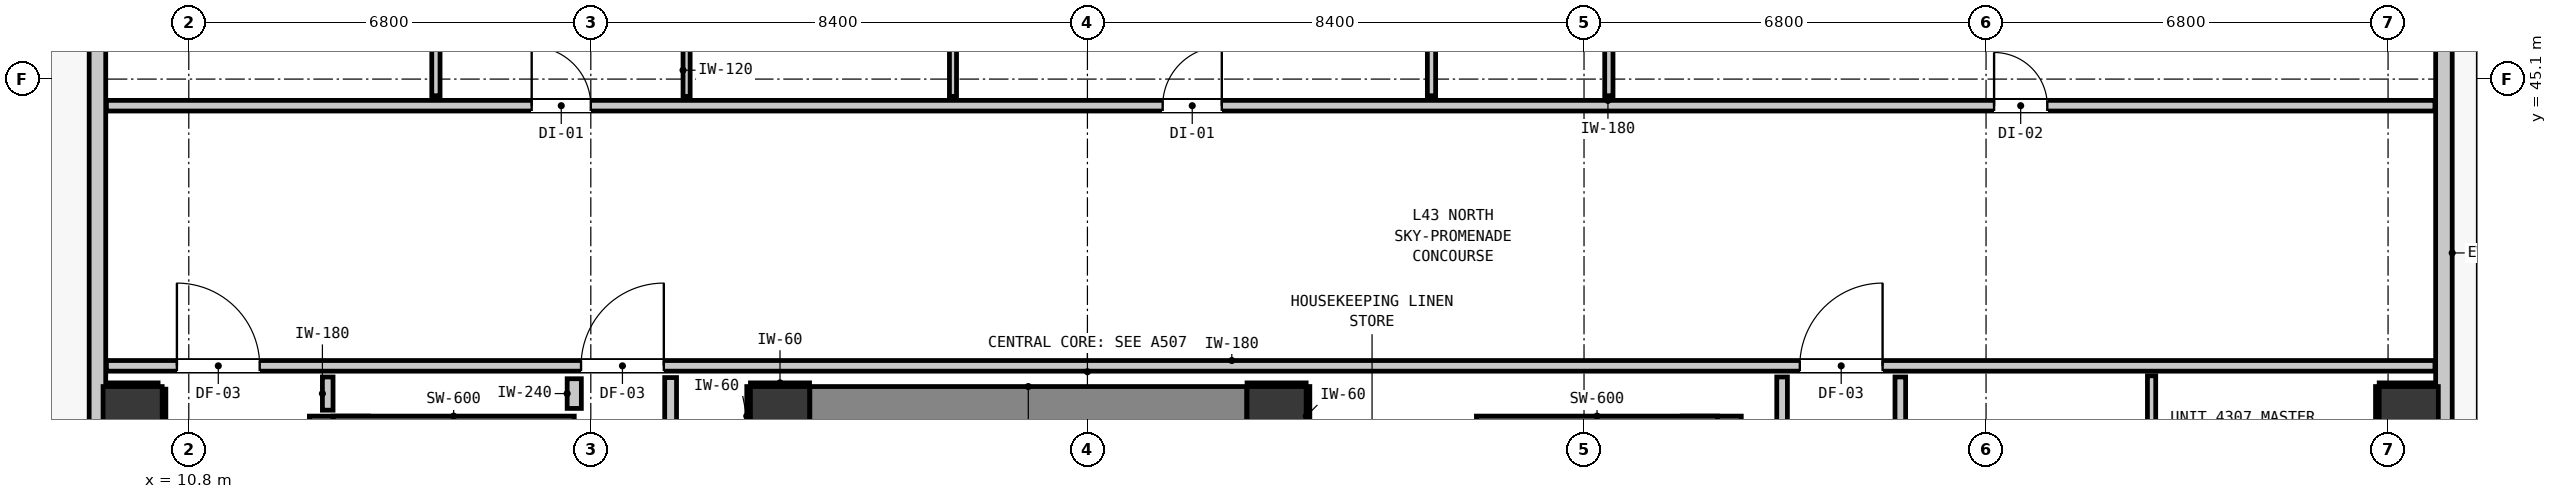
"""IFC4 building model, lengths in metres.
Left out: names, types, materials, properties, quantities, classifications, styles, units other than length and angle.
Written with IfcOpenShell. Run it as: python <this file> out.ifc"""

import sys

from ifc_helpers import new_model, si_unit, direction, frame, frame_2d, origin, origin_2d, place, context, subcontext, project, spatial, rectangle, extrude, element, fill, save


model = new_model("IFC4")
c1 = context("Model", 3, precision=1e-05, world=origin(), true_north=direction((0.0, 1.0)))
c2 = subcontext(c1, "Body", "Model", "MODEL_VIEW")
j1 = project(units=[si_unit("LENGTHUNIT", "METRE"), si_unit("PLANEANGLEUNIT", "RADIAN")], contexts=[c1])
p1 = place(None, origin())
s1 = spatial("IfcSite", under=j1, at=p1, CompositionType="ELEMENT")
p2 = place(p1, origin())
s2 = spatial("IfcBuilding", under=s1, at=p2, CompositionType="ELEMENT")
p3 = place(p2, frame((0.0, 0.0, 149.24)))
s3 = spatial("IfcBuildingStorey", under=s2, at=p3, CompositionType="ELEMENT", Elevation=149.24)
for number, where, z_axis, x_axis in (
    (1, (20.8, 39.4, 0.0), (0.0, 0.0, 1.0), (1.0, 0.0, 0.0)),
    (2, (29.2, 39.4, 0.0), (0.0, 0.0, 1.0), (1.0, 0.0, 0.0)),
):
    element("IfcColumn", number, at=place(p3, frame(where, z_axis=z_axis, x_axis=x_axis)), inside=s3, PredefinedType="COLUMN", context=c2, shape_type="SweptSolid", body=[
        extrude(rectangle(XDim=1.0, YDim=1.0, at=origin_2d()), origin(), (0.0, 0.0, 1.0), 3.32),
    ])
p4 = place(p3, frame((13.34, 31.205, 0.0), z_axis=(0.0, 0.0, 1.0), x_axis=(0.0, 1.0, 0.0)))
e3 = element("IfcWall", 3, at=p4, inside=s3, PredefinedType="SHEAR", context=c2, shape_type="SweptSolid", body=[
    extrude(rectangle(XDim=8.195, YDim=1.0, at=frame_2d((4.097, 0.0))), origin(), (0.0, 0.0, 1.0), 3.32),
])
p5 = place(p3, frame((13.24, 39.1, 0.0), z_axis=(0.0, 0.0, 1.0), x_axis=(1.0, 0.0, 0.0)))
e4 = element("IfcWall", 4, at=p5, inside=s3, PredefinedType="SHEAR", context=c2, shape_type="SweptSolid", body=[
    extrude(rectangle(XDim=4.08, YDim=0.6, at=frame_2d((2.04, 0.0))), origin(), (0.0, 0.0, 1.0), 3.32),
])
p6 = place(p3, frame((36.56, 31.205, 0.0), z_axis=(0.0, 0.0, 1.0), x_axis=(0.0, 1.0, 0.0)))
e5 = element("IfcWall", 5, at=p6, inside=s3, PredefinedType="SHEAR", context=c2, shape_type="SweptSolid", body=[
    extrude(rectangle(XDim=8.195, YDim=1.0, at=frame_2d((4.097, 0.0))), origin(), (0.0, 0.0, 1.0), 3.32),
])
p7 = place(p3, frame((32.58, 39.1, 0.0), z_axis=(0.0, 0.0, 1.0), x_axis=(1.0, 0.0, 0.0)))
e6 = element("IfcWall", 6, at=p7, inside=s3, PredefinedType="SHEAR", context=c2, shape_type="SweptSolid", body=[
    extrude(rectangle(XDim=4.08, YDim=0.6, at=frame_2d((2.04, 0.0))), origin(), (0.0, 0.0, 1.0), 3.32),
])
p8 = place(p3, frame((21.305, 39.4, 0.0), z_axis=(0.0, 0.0, 1.0), x_axis=(1.0, 0.0, 0.0)))
e7 = element("IfcWall", 7, at=p8, inside=s3, PredefinedType="SHEAR", context=c2, shape_type="SweptSolid", body=[
    extrude(rectangle(XDim=7.39, YDim=1.0, at=frame_2d((3.695, 0.0))), origin(), (0.0, 0.0, 1.0), 3.32),
])
for number, where, z_axis, x_axis in (
    (8, (9.85, 39.4, 0.0), (0.0, 0.0, 1.0), (1.0, 0.0, 0.0)),
    (9, (48.35, 39.4, 0.0), (0.0, 0.0, 1.0), (1.0, 0.0, 0.0)),
):
    element("IfcColumn", number, at=place(p3, frame(where, z_axis=z_axis, x_axis=x_axis)), inside=s3, PredefinedType="COLUMN", context=c2, shape_type="SweptSolid", body=[
        extrude(rectangle(XDim=1.0, YDim=1.0, at=origin_2d()), origin(), (0.0, 0.0, 1.0), 3.32),
    ])
p9 = place(p3, frame((9.255, 17.555, 0.0), z_axis=(0.0, 0.0, 1.0), x_axis=(0.0, 1.0, 0.0)))
e10 = element("IfcWall", 10, at=p9, inside=s3, PredefinedType="STANDARD", context=c2, shape_type="SweptSolid", body=[
    extrude(rectangle(XDim=32.29, YDim=0.28, at=frame_2d((16.145, 0.0))), origin(), (0.0, 0.0, 1.0), 3.08),
])
p10 = place(p9, frame((5.467, 0.0, 0.0)))
e11 = element("IfcOpeningElement", 11, at=p10, cuts=e10, PredefinedType="OPENING", context=c2, shape_type="SweptSolid", body=[
    extrude(rectangle(XDim=1.0, YDim=2.15, at=frame_2d((0.5, 1.075))), frame((0.0, 0.15, 0.0), z_axis=(0.0, -1.0, 0.0), x_axis=(1.0, 0.0, 0.0)), (0.0, 0.0, 1.0), 0.3),
])
p11 = place(p9, frame((30.753, 0.0, 0.85)))
e12 = element("IfcOpeningElement", 12, at=p11, cuts=e10, PredefinedType="OPENING", context=c2, shape_type="SweptSolid", body=[
    extrude(rectangle(XDim=1.05, YDim=1.65, at=frame_2d((0.525, 0.825))), frame((0.0, 0.15, 0.0), z_axis=(0.0, -1.0, 0.0), x_axis=(1.0, 0.0, 0.0)), (0.0, 0.0, 1.0), 0.3),
])
p12 = place(p3, frame((48.945, 49.845, 0.0), z_axis=(0.0, 0.0, 1.0), x_axis=(0.0, -1.0, 0.0)))
e13 = element("IfcWall", 13, at=p12, inside=s3, PredefinedType="STANDARD", context=c2, shape_type="SweptSolid", body=[
    extrude(rectangle(XDim=32.29, YDim=0.28, at=frame_2d((16.145, 0.0))), origin(), (0.0, 0.0, 1.0), 3.08),
])
p13 = place(p12, frame((0.904, 0.0, 0.0)))
e14 = element("IfcOpeningElement", 14, at=p13, cuts=e13, PredefinedType="OPENING", context=c2, shape_type="SweptSolid", body=[
    extrude(rectangle(XDim=1.0, YDim=2.15, at=frame_2d((0.5, 1.075))), frame((0.0, 0.15, 0.0), z_axis=(0.0, -1.0, 0.0), x_axis=(1.0, 0.0, 0.0)), (0.0, 0.0, 1.0), 0.3),
])
p14 = place(p12, frame((3.074, 0.0, 0.85)))
e15 = element("IfcOpeningElement", 15, at=p14, cuts=e13, PredefinedType="OPENING", context=c2, shape_type="SweptSolid", body=[
    extrude(rectangle(XDim=1.05, YDim=1.65, at=frame_2d((0.525, 0.825))), frame((0.0, 0.15, 0.0), z_axis=(0.0, -1.0, 0.0), x_axis=(1.0, 0.0, 0.0)), (0.0, 0.0, 1.0), 0.3),
])
p15 = place(p12, frame((23.057, 0.0, 0.85)))
e16 = element("IfcOpeningElement", 16, at=p15, cuts=e13, PredefinedType="OPENING", context=c2, shape_type="SweptSolid", body=[
    extrude(rectangle(XDim=2.7, YDim=2.0, at=frame_2d((1.35, 1.0))), frame((0.0, 0.15, 0.0), z_axis=(0.0, -1.0, 0.0), x_axis=(1.0, 0.0, 0.0)), (0.0, 0.0, 1.0), 0.3),
])
p16 = place(p12, frame((20.733, 0.0, 0.85)))
e17 = element("IfcOpeningElement", 17, at=p16, cuts=e13, PredefinedType="OPENING", context=c2, shape_type="SweptSolid", body=[
    extrude(rectangle(XDim=1.05, YDim=1.65, at=frame_2d((0.525, 0.825))), frame((0.0, 0.15, 0.0), z_axis=(0.0, -1.0, 0.0), x_axis=(1.0, 0.0, 0.0)), (0.0, 0.0, 1.0), 0.3),
])
p17 = place(p12, frame((13.523, 0.0, 0.85)))
e18 = element("IfcOpeningElement", 18, at=p17, cuts=e13, PredefinedType="OPENING", context=c2, shape_type="SweptSolid", body=[
    extrude(rectangle(XDim=2.7, YDim=2.0, at=frame_2d((1.35, 1.0))), frame((0.0, 0.15, 0.0), z_axis=(0.0, -1.0, 0.0), x_axis=(1.0, 0.0, 0.0)), (0.0, 0.0, 1.0), 0.3),
])
p18 = place(p12, frame((11.247, 0.0, 0.85)))
e19 = element("IfcOpeningElement", 19, at=p18, cuts=e13, PredefinedType="OPENING", context=c2, shape_type="SweptSolid", body=[
    extrude(rectangle(XDim=1.05, YDim=1.65, at=frame_2d((0.525, 0.825))), frame((0.0, 0.15, 0.0), z_axis=(0.0, -1.0, 0.0), x_axis=(1.0, 0.0, 0.0)), (0.0, 0.0, 1.0), 0.3),
])
p19 = place(p3, frame((9.407, 40.25, 0.0), z_axis=(0.0, 0.0, 1.0), x_axis=(1.0, 0.0, 0.0)))
e20 = element("IfcWall", 20, at=p19, inside=s3, PredefinedType="PARTITIONING", context=c2, shape_type="SweptSolid", body=[
    extrude(rectangle(XDim=39.386, YDim=0.18, at=frame_2d((19.693, 0.0))), origin(), (0.0, 0.0, 1.0), 3.08),
])
p20 = place(p19, frame((8.028, 0.0, 0.0)))
e21 = element("IfcOpeningElement", 21, at=p20, cuts=e20, PredefinedType="OPENING", context=c2, shape_type="SweptSolid", body=[
    extrude(rectangle(XDim=1.4, YDim=2.15, at=frame_2d((0.7, 1.075))), frame((0.0, 0.1, 0.0), z_axis=(0.0, -1.0, 0.0), x_axis=(1.0, 0.0, 0.0)), (0.0, 0.0, 1.0), 0.2),
])
p21 = place(p19, frame((1.192, 0.0, 0.0)))
e22 = element("IfcOpeningElement", 22, at=p21, cuts=e20, PredefinedType="OPENING", context=c2, shape_type="SweptSolid", body=[
    extrude(rectangle(XDim=1.4, YDim=2.15, at=frame_2d((0.7, 1.075))), frame((0.0, 0.1, 0.0), z_axis=(0.0, -1.0, 0.0), x_axis=(1.0, 0.0, 0.0)), (0.0, 0.0, 1.0), 0.2),
])
p22 = place(p19, frame((28.643, 0.0, 0.0)))
e23 = element("IfcOpeningElement", 23, at=p22, cuts=e20, PredefinedType="OPENING", context=c2, shape_type="SweptSolid", body=[
    extrude(rectangle(XDim=1.4, YDim=2.15, at=frame_2d((0.7, 1.075))), frame((0.0, 0.1, 0.0), z_axis=(0.0, -1.0, 0.0), x_axis=(1.0, 0.0, 0.0)), (0.0, 0.0, 1.0), 0.2),
])
p23 = place(p3, frame((9.407, 44.65, 0.0), z_axis=(0.0, 0.0, 1.0), x_axis=(1.0, 0.0, 0.0)))
e24 = element("IfcWall", 24, at=p23, inside=s3, PredefinedType="PARTITIONING", context=c2, shape_type="SweptSolid", body=[
    extrude(rectangle(XDim=39.386, YDim=0.18, at=frame_2d((19.693, 0.0))), origin(), (0.0, 0.0, 1.0), 3.08),
])
p24 = place(p23, frame((7.193, 0.0, 0.0)))
e25 = element("IfcOpeningElement", 25, at=p24, cuts=e24, PredefinedType="OPENING", context=c2, shape_type="SweptSolid", body=[
    extrude(rectangle(XDim=1.0, YDim=2.15, at=frame_2d((0.5, 1.075))), frame((0.0, 0.1, 0.0), z_axis=(0.0, -1.0, 0.0), x_axis=(1.0, 0.0, 0.0)), (0.0, 0.0, 1.0), 0.2),
])
p25 = place(p23, frame((17.866, 0.0, 0.0)))
e26 = element("IfcOpeningElement", 26, at=p25, cuts=e24, PredefinedType="OPENING", context=c2, shape_type="SweptSolid", body=[
    extrude(rectangle(XDim=1.0, YDim=2.15, at=frame_2d((0.5, 1.075))), frame((0.0, 0.1, 0.0), z_axis=(0.0, -1.0, 0.0), x_axis=(1.0, 0.0, 0.0)), (0.0, 0.0, 1.0), 0.2),
])
p26 = place(p23, frame((31.929, 0.0, 0.0)))
e27 = element("IfcOpeningElement", 27, at=p26, cuts=e24, PredefinedType="OPENING", context=c2, shape_type="SweptSolid", body=[
    extrude(rectangle(XDim=0.9, YDim=2.1, at=frame_2d((0.45, 1.05))), frame((0.0, 0.1, 0.0), z_axis=(0.0, -1.0, 0.0), x_axis=(1.0, 0.0, 0.0)), (0.0, 0.0, 1.0), 0.2),
])
p27 = place(p3, frame((17.32, 39.53, 0.0), z_axis=(0.0, 0.0, 1.0), x_axis=(0.0, 1.0, 0.0)))
e28 = element("IfcWall", 28, at=p27, inside=s3, PredefinedType="PARTITIONING", context=c2, shape_type="SweptSolid", body=[
    extrude(rectangle(XDim=0.502, YDim=0.24, at=frame_2d((0.251, 0.0))), origin(), (0.0, 0.0, 1.0), 3.08),
])
p28 = place(p3, frame((18.95, 38.918, 0.0), z_axis=(0.0, 0.0, 1.0), x_axis=(0.0, 1.0, 0.0)))
e29 = element("IfcWall", 29, at=p28, inside=s3, PredefinedType="PARTITIONING", context=c2, shape_type="SweptSolid", body=[
    extrude(rectangle(XDim=1.134, YDim=0.2, at=frame_2d((0.567, 0.0))), origin(), (0.0, 0.0, 1.0), 3.08),
])
p29 = place(p3, frame((13.15, 39.5, 0.0), z_axis=(0.0, 0.0, 1.0), x_axis=(0.0, 1.0, 0.0)))
e30 = element("IfcWall", 30, at=p29, inside=s3, PredefinedType="PARTITIONING", context=c2, shape_type="SweptSolid", body=[
    extrude(rectangle(XDim=0.562, YDim=0.18, at=frame_2d((0.281, 0.0))), origin(), (0.0, 0.0, 1.0), 2.315),
])
p30 = place(p3, frame((37.75, 21.368, 0.0), z_axis=(0.0, 0.0, 1.0), x_axis=(0.0, 1.0, 0.0)))
e31 = element("IfcWall", 31, at=p30, inside=s3, PredefinedType="PARTITIONING", context=c2, shape_type="SweptSolid", body=[
    extrude(rectangle(XDim=18.694, YDim=0.18, at=frame_2d((9.347, 0.0))), origin(), (0.0, 0.0, 1.0), 3.08),
])
p31 = place(p3, frame((39.75, 37.313, 0.0), z_axis=(0.0, 0.0, 1.0), x_axis=(0.0, 1.0, 0.0)))
e32 = element("IfcWall", 32, at=p31, inside=s3, PredefinedType="PARTITIONING", context=c2, shape_type="SweptSolid", body=[
    extrude(rectangle(XDim=2.749, YDim=0.18, at=frame_2d((1.375, 0.0))), origin(), (0.0, 0.0, 1.0), 3.08),
])
p32 = place(p3, frame((14.98, 44.818, 0.0), z_axis=(0.0, 0.0, 1.0), x_axis=(0.0, 1.0, 0.0)))
e33 = element("IfcWall", 33, at=p32, inside=s3, PredefinedType="PARTITIONING", context=c2, shape_type="SweptSolid", body=[
    extrude(rectangle(XDim=2.844, YDim=0.14, at=frame_2d((1.422, 0.0))), origin(), (0.0, 0.0, 1.0), 3.08),
])
p33 = place(p32, frame((0.995, 0.0, 0.0)))
e34 = element("IfcOpeningElement", 34, at=p33, cuts=e33, PredefinedType="OPENING", context=c2, shape_type="SweptSolid", body=[
    extrude(rectangle(XDim=0.86, YDim=2.02, at=frame_2d((0.43, 1.01))), frame((0.0, 0.08, 0.0), z_axis=(0.0, -1.0, 0.0), x_axis=(1.0, 0.0, 0.0)), (0.0, 0.0, 1.0), 0.16),
])
p34 = place(p3, frame((31.82, 44.818, 0.0), z_axis=(0.0, 0.0, 1.0), x_axis=(0.0, 1.0, 0.0)))
e35 = element("IfcWall", 35, at=p34, inside=s3, PredefinedType="PARTITIONING", context=c2, shape_type="SweptSolid", body=[
    extrude(rectangle(XDim=2.844, YDim=0.14, at=frame_2d((1.422, 0.0))), origin(), (0.0, 0.0, 1.0), 3.08),
])
p35 = place(p34, frame((0.975, 0.0, 0.0)))
e36 = element("IfcOpeningElement", 36, at=p35, cuts=e35, PredefinedType="OPENING", context=c2, shape_type="SweptSolid", body=[
    extrude(rectangle(XDim=0.9, YDim=2.1, at=frame_2d((0.45, 1.05))), frame((0.0, 0.08, 0.0), z_axis=(0.0, -1.0, 0.0), x_axis=(1.0, 0.0, 0.0)), (0.0, 0.0, 1.0), 0.16),
])
p36 = place(p3, frame((34.82, 44.818, 0.0), z_axis=(0.0, 0.0, 1.0), x_axis=(0.0, 1.0, 0.0)))
e37 = element("IfcWall", 37, at=p36, inside=s3, PredefinedType="PARTITIONING", context=c2, shape_type="SweptSolid", body=[
    extrude(rectangle(XDim=2.844, YDim=0.14, at=frame_2d((1.422, 0.0))), origin(), (0.0, 0.0, 1.0), 3.08),
])
p37 = place(p3, frame((44.0, 37.293, 0.0), z_axis=(0.0, 0.0, 1.0), x_axis=(0.0, 1.0, 0.0)))
e38 = element("IfcWall", 38, at=p37, inside=s3, PredefinedType="PARTITIONING", context=c2, shape_type="SweptSolid", body=[
    extrude(rectangle(XDim=2.789, YDim=0.14, at=frame_2d((1.395, 0.0))), origin(), (0.0, 0.0, 1.0), 3.08),
])
p38 = place(p3, frame((19.22, 44.808, 0.0), z_axis=(0.0, 0.0, 1.0), x_axis=(0.0, 1.0, 0.0)))
e39 = element("IfcWall", 39, at=p38, inside=s3, PredefinedType="PARTITIONING", context=c2, shape_type="SweptSolid", body=[
    extrude(rectangle(XDim=2.864, YDim=0.12, at=frame_2d((1.432, 0.0))), origin(), (0.0, 0.0, 1.0), 3.08),
])
p39 = place(p38, frame((0.985, 0.0, 0.0)))
e40 = element("IfcOpeningElement", 40, at=p39, cuts=e39, PredefinedType="OPENING", context=c2, shape_type="SweptSolid", body=[
    extrude(rectangle(XDim=0.9, YDim=2.1, at=frame_2d((0.45, 1.05))), frame((0.0, 0.07, 0.0), z_axis=(0.0, -1.0, 0.0), x_axis=(1.0, 0.0, 0.0)), (0.0, 0.0, 1.0), 0.14),
])
p40 = place(p3, frame((23.726, 44.808, 0.0), z_axis=(0.0, 0.0, 1.0), x_axis=(0.0, 1.0, 0.0)))
e41 = element("IfcWall", 41, at=p40, inside=s3, PredefinedType="PARTITIONING", context=c2, shape_type="SweptSolid", body=[
    extrude(rectangle(XDim=2.864, YDim=0.12, at=frame_2d((1.432, 0.0))), origin(), (0.0, 0.0, 1.0), 3.08),
])
for number, where, z_axis, x_axis in (
    (42, (20.3, 39.932, 0.0), (0.0, 0.0, 1.0), (1.0, 0.0, 0.0)),
    (43, (20.268, 38.9, 0.0), (0.0, 0.0, 1.0), (0.0, 1.0, 0.0)),
    (44, (28.7, 39.932, 0.0), (0.0, 0.0, 1.0), (1.0, 0.0, 0.0)),
    (45, (29.732, 38.9, 0.0), (0.0, 0.0, 1.0), (0.0, 1.0, 0.0)),
):
    element("IfcWall", number, at=place(p3, frame(where, z_axis=z_axis, x_axis=x_axis)), inside=s3, PredefinedType="PARTITIONING", context=c2, shape_type="SweptSolid", body=[
        extrude(rectangle(XDim=1.0, YDim=0.06, at=frame_2d((0.5, 0.0))), origin(), (0.0, 0.0, 1.0), 1.45),
    ])
p41 = place(p3, frame((9.41, 39.932, 0.0), z_axis=(0.0, 0.0, 1.0), x_axis=(1.0, 0.0, 0.0)))
e46 = element("IfcWall", 46, at=p41, inside=s3, PredefinedType="PARTITIONING", context=c2, shape_type="SweptSolid", body=[
    extrude(rectangle(XDim=0.871, YDim=0.06, at=frame_2d((0.436, 0.0))), origin(), (0.0, 0.0, 1.0), 1.45),
])
p42 = place(p3, frame((10.382, 38.9, 0.0), z_axis=(0.0, 0.0, 1.0), x_axis=(0.0, 1.0, 0.0)))
e47 = element("IfcWall", 47, at=p42, inside=s3, PredefinedType="PARTITIONING", context=c2, shape_type="SweptSolid", body=[
    extrude(rectangle(XDim=0.956, YDim=0.06, at=frame_2d((0.478, 0.0))), origin(), (0.0, 0.0, 1.0), 1.45),
])
p43 = place(p3, frame((47.85, 39.932, 0.0), z_axis=(0.0, 0.0, 1.0), x_axis=(1.0, 0.0, 0.0)))
e48 = element("IfcWall", 48, at=p43, inside=s3, PredefinedType="PARTITIONING", context=c2, shape_type="SweptSolid", body=[
    extrude(rectangle(XDim=0.94, YDim=0.06, at=frame_2d((0.47, 0.0))), origin(), (0.0, 0.0, 1.0), 1.45),
])
p44 = place(p3, frame((47.818, 38.9, 0.0), z_axis=(0.0, 0.0, 1.0), x_axis=(0.0, 1.0, 0.0)))
e49 = element("IfcWall", 49, at=p44, inside=s3, PredefinedType="PARTITIONING", context=c2, shape_type="SweptSolid", body=[
    extrude(rectangle(XDim=1.0, YDim=0.06, at=frame_2d((0.5, 0.0))), origin(), (0.0, 0.0, 1.0), 1.45),
])
p45 = place(p20, origin())
e50 = element("IfcDoor", 50, at=p45, inside=s3, OperationType="SINGLE_SWING_RIGHT", PredefinedType="DOOR", context=c2, shape_type="SweptSolid", body=[
    extrude(rectangle(XDim=1.4, YDim=2.15, at=frame_2d((0.7, 1.075))), frame((0.0, 0.025, 0.0), z_axis=(0.0, -1.0, 0.0), x_axis=(1.0, 0.0, 0.0)), (0.0, 0.0, 1.0), 0.05),
])
fill(e21, e50)
p46 = place(p21, origin())
e51 = element("IfcDoor", 51, at=p46, inside=s3, OperationType="SINGLE_SWING_LEFT", PredefinedType="DOOR", context=c2, shape_type="SweptSolid", body=[
    extrude(rectangle(XDim=1.4, YDim=2.15, at=frame_2d((0.7, 1.075))), frame((0.0, 0.025, 0.0), z_axis=(0.0, -1.0, 0.0), x_axis=(1.0, 0.0, 0.0)), (0.0, 0.0, 1.0), 0.05),
])
fill(e22, e51)
p47 = place(p22, origin())
e52 = element("IfcDoor", 52, at=p47, inside=s3, OperationType="SINGLE_SWING_RIGHT", PredefinedType="DOOR", context=c2, shape_type="SweptSolid", body=[
    extrude(rectangle(XDim=1.4, YDim=2.15, at=frame_2d((0.7, 1.075))), frame((0.0, 0.025, 0.0), z_axis=(0.0, -1.0, 0.0), x_axis=(1.0, 0.0, 0.0)), (0.0, 0.0, 1.0), 0.05),
])
fill(e23, e52)
p48 = place(p24, origin())
e53 = element("IfcDoor", 53, at=p48, inside=s3, OperationType="SINGLE_SWING_LEFT", PredefinedType="DOOR", context=c2, shape_type="SweptSolid", body=[
    extrude(rectangle(XDim=1.0, YDim=2.15, at=frame_2d((0.5, 1.075))), frame((0.0, 0.025, 0.0), z_axis=(0.0, -1.0, 0.0), x_axis=(1.0, 0.0, 0.0)), (0.0, 0.0, 1.0), 0.05),
])
fill(e25, e53)
p49 = place(p25, origin())
e54 = element("IfcDoor", 54, at=p49, inside=s3, OperationType="SINGLE_SWING_RIGHT", PredefinedType="DOOR", context=c2, shape_type="SweptSolid", body=[
    extrude(rectangle(XDim=1.0, YDim=2.15, at=frame_2d((0.5, 1.075))), frame((0.0, 0.025, 0.0), z_axis=(0.0, -1.0, 0.0), x_axis=(1.0, 0.0, 0.0)), (0.0, 0.0, 1.0), 0.05),
])
fill(e26, e54)
p50 = place(p26, origin())
e55 = element("IfcDoor", 55, at=p50, inside=s3, OperationType="SINGLE_SWING_LEFT", PredefinedType="DOOR", context=c2, shape_type="SweptSolid", body=[
    extrude(rectangle(XDim=0.9, YDim=2.1, at=frame_2d((0.45, 1.05))), frame((0.0, 0.025, 0.0), z_axis=(0.0, -1.0, 0.0), x_axis=(1.0, 0.0, 0.0)), (0.0, 0.0, 1.0), 0.05),
])
fill(e27, e55)
save(model, sys.argv[1])
